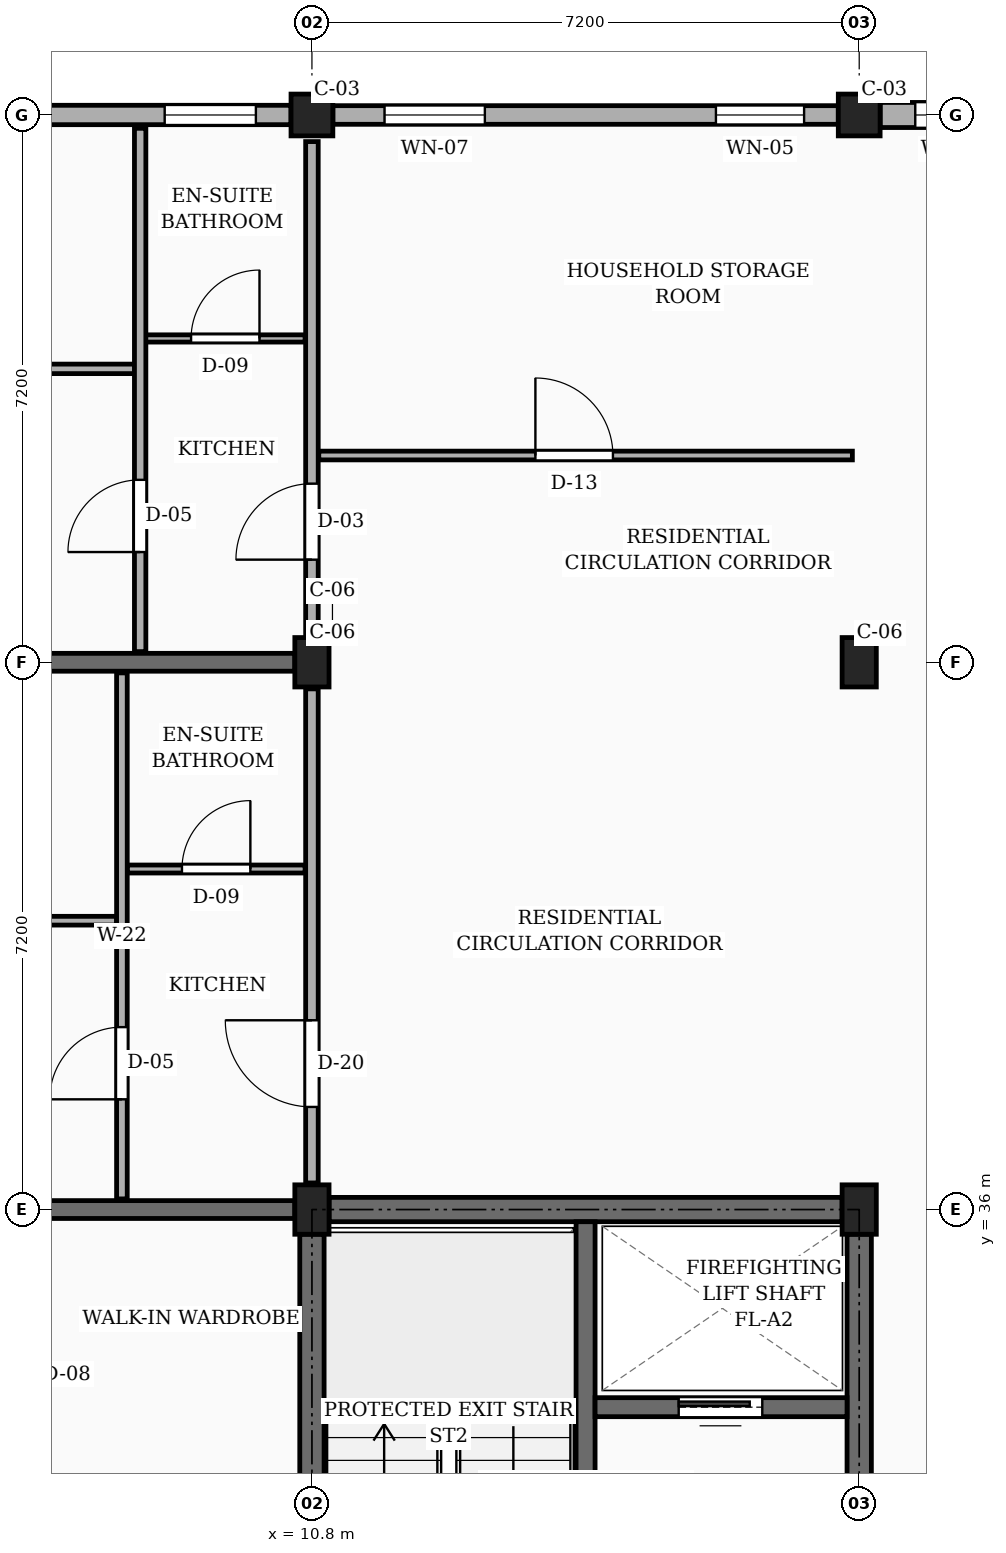
"""IFC4 building model, lengths in metres.
Left out: names, types, materials, properties, quantities, classifications, styles, units other than length and angle.
Written with IfcOpenShell. Run it as: python <this file> out.ifc"""

import sys

from ifc_helpers import new_model, si_unit, direction, frame, frame_2d, origin, origin_2d, place, context, subcontext, project, spatial, rectangle, extrude, element, fill, save


model = new_model("IFC4")
c1 = context("Model", 3, precision=1e-05, world=origin(), true_north=direction((0.0, 1.0)))
c2 = subcontext(c1, "Body", "Model", "MODEL_VIEW")
j1 = project(units=[si_unit("LENGTHUNIT", "METRE"), si_unit("PLANEANGLEUNIT", "RADIAN")], contexts=[c1])
p1 = place(None, origin())
s1 = spatial("IfcSite", under=j1, at=p1, CompositionType="ELEMENT")
p2 = place(p1, origin())
s2 = spatial("IfcBuilding", under=s1, at=p2, CompositionType="ELEMENT")
p3 = place(p2, frame((0.0, 0.0, 17.1)))
s3 = spatial("IfcBuildingStorey", under=s2, at=p3, CompositionType="ELEMENT", Elevation=17.1)
for number, where, z_axis, x_axis in (
    (1, (10.8, 36.0, 0.0), (0.0, 0.0, 1.0), (1.0, 0.0, 0.0)),
    (2, (10.8, 43.2, 0.0), (0.0, 0.0, 1.0), (1.0, 0.0, 0.0)),
):
    element("IfcColumn", number, at=place(p3, frame(where, z_axis=z_axis, x_axis=x_axis)), inside=s3, PredefinedType="COLUMN", context=c2, shape_type="SweptSolid", body=[
        extrude(rectangle(XDim=0.45, YDim=0.65, at=origin_2d()), origin(), (0.0, 0.0, 1.0), 3.15),
    ])
p4 = place(p3, frame((10.8, 50.4, 0.0), z_axis=(0.0, 0.0, 1.0), x_axis=(1.0, 0.0, 0.0)))
e3 = element("IfcColumn", 3, at=p4, inside=s3, PredefinedType="COLUMN", context=c2, shape_type="SweptSolid", body=[
    extrude(rectangle(XDim=0.55, YDim=0.55, at=origin_2d()), origin(), (0.0, 0.0, 1.0), 3.15),
])
for number, where, z_axis, x_axis in (
    (4, (18.0, 36.0, 0.0), (0.0, 0.0, 1.0), (1.0, 0.0, 0.0)),
    (5, (18.0, 43.2, 0.0), (0.0, 0.0, 1.0), (1.0, 0.0, 0.0)),
):
    element("IfcColumn", number, at=place(p3, frame(where, z_axis=z_axis, x_axis=x_axis)), inside=s3, PredefinedType="COLUMN", context=c2, shape_type="SweptSolid", body=[
        extrude(rectangle(XDim=0.45, YDim=0.65, at=origin_2d()), origin(), (0.0, 0.0, 1.0), 3.15),
    ])
p5 = place(p3, frame((18.0, 50.4, 0.0), z_axis=(0.0, 0.0, 1.0), x_axis=(1.0, 0.0, 0.0)))
e6 = element("IfcColumn", 6, at=p5, inside=s3, PredefinedType="COLUMN", context=c2, shape_type="SweptSolid", body=[
    extrude(rectangle(XDim=0.55, YDim=0.55, at=origin_2d()), origin(), (0.0, 0.0, 1.0), 3.15),
])
for number, where, z_axis, x_axis in (
    (7, (3.875, 36.0, 0.0), (0.0, 0.0, 1.0), (1.0, 0.0, 0.0)),
    (8, (3.875, 43.2, 0.0), (0.0, 0.0, 1.0), (1.0, 0.0, 0.0)),
):
    element("IfcWall", number, at=place(p3, frame(where, z_axis=z_axis, x_axis=x_axis)), inside=s3, PredefinedType="SOLIDWALL", context=c2, shape_type="SweptSolid", body=[
        extrude(rectangle(XDim=6.7, YDim=0.235, at=frame_2d((3.35, 0.0))), origin(), (0.0, 0.0, 1.0), 2.17),
    ])
p6 = place(p3, frame((24.925, 50.4, 0.0), z_axis=(0.0, 0.0, 1.0), x_axis=(-1.0, 0.0, 0.0)))
e9 = element("IfcWall", 9, at=p6, inside=s3, PredefinedType="SOLIDWALL", context=c2, shape_type="SweptSolid", body=[
    extrude(rectangle(XDim=6.65, YDim=0.33, at=frame_2d((3.325, 0.0))), origin(), (0.0, 0.0, 1.0), 2.44),
])
p7 = place(p6, frame((1.982, 0.0, 0.78)))
e10 = element("IfcOpeningElement", 10, at=p7, cuts=e9, PredefinedType="OPENING", context=c2, shape_type="SweptSolid", body=[
    extrude(rectangle(XDim=1.0, YDim=1.15, at=frame_2d((0.5, 0.575))), frame((0.0, 0.175, 0.0), z_axis=(0.0, -1.0, 0.0), x_axis=(1.0, 0.0, 0.0)), (0.0, 0.0, 1.0), 0.35),
])
p8 = place(p6, frame((5.147, 0.0, 0.78)))
e11 = element("IfcOpeningElement", 11, at=p8, cuts=e9, PredefinedType="OPENING", context=c2, shape_type="SweptSolid", body=[
    extrude(rectangle(XDim=1.04, YDim=1.26, at=frame_2d((0.52, 0.63))), frame((0.0, 0.175, 0.0), z_axis=(0.0, -1.0, 0.0), x_axis=(1.0, 0.0, 0.0)), (0.0, 0.0, 1.0), 0.35),
])
p9 = place(p3, frame((17.725, 50.4, 0.0), z_axis=(0.0, 0.0, 1.0), x_axis=(-1.0, 0.0, 0.0)))
e12 = element("IfcWall", 12, at=p9, inside=s3, PredefinedType="SOLIDWALL", context=c2, shape_type="SweptSolid", body=[
    extrude(rectangle(XDim=6.65, YDim=0.245, at=frame_2d((3.325, 0.0))), origin(), (0.0, 0.0, 1.0), 2.44),
])
p10 = place(p9, frame((0.45, 0.0, 0.78)))
e13 = element("IfcOpeningElement", 13, at=p10, cuts=e12, PredefinedType="OPENING", context=c2, shape_type="SweptSolid", body=[
    extrude(rectangle(XDim=1.16, YDim=1.15, at=frame_2d((0.58, 0.575))), frame((0.0, 0.133, 0.0), z_axis=(0.0, -1.0, 0.0), x_axis=(1.0, 0.0, 0.0)), (0.0, 0.0, 1.0), 0.265),
])
p11 = place(p9, frame((4.65, 0.0, 0.78)))
e14 = element("IfcOpeningElement", 14, at=p11, cuts=e12, PredefinedType="OPENING", context=c2, shape_type="SweptSolid", body=[
    extrude(rectangle(XDim=1.32, YDim=1.15, at=frame_2d((0.66, 0.575))), frame((0.0, 0.133, 0.0), z_axis=(0.0, -1.0, 0.0), x_axis=(1.0, 0.0, 0.0)), (0.0, 0.0, 1.0), 0.265),
])
p12 = place(p3, frame((10.525, 50.4, 0.0), z_axis=(0.0, 0.0, 1.0), x_axis=(-1.0, 0.0, 0.0)))
e15 = element("IfcWall", 15, at=p12, inside=s3, PredefinedType="SOLIDWALL", context=c2, shape_type="SweptSolid", body=[
    extrude(rectangle(XDim=6.65, YDim=0.255, at=frame_2d((3.325, 0.0))), origin(), (0.0, 0.0, 1.0), 2.44),
])
p13 = place(p12, frame((0.462, 0.0, 0.78)))
e16 = element("IfcOpeningElement", 16, at=p13, cuts=e15, PredefinedType="OPENING", context=c2, shape_type="SweptSolid", body=[
    extrude(rectangle(XDim=1.2, YDim=1.26, at=frame_2d((0.6, 0.63))), frame((0.0, 0.137, 0.0), z_axis=(0.0, -1.0, 0.0), x_axis=(1.0, 0.0, 0.0)), (0.0, 0.0, 1.0), 0.275),
])
p14 = place(p12, frame((3.808, 0.0, 0.78)))
e17 = element("IfcOpeningElement", 17, at=p14, cuts=e15, PredefinedType="OPENING", context=c2, shape_type="SweptSolid", body=[
    extrude(rectangle(XDim=0.88, YDim=1.26, at=frame_2d((0.44, 0.63))), frame((0.0, 0.137, 0.0), z_axis=(0.0, -1.0, 0.0), x_axis=(1.0, 0.0, 0.0)), (0.0, 0.0, 1.0), 0.275),
])
p15 = place(p3, frame((10.8, 29.125, 0.0), z_axis=(0.0, 0.0, 1.0), x_axis=(0.0, 1.0, 0.0)))
e18 = element("IfcWall", 18, at=p15, inside=s3, PredefinedType="SHEAR", context=c2, shape_type="SweptSolid", body=[
    extrude(rectangle(XDim=6.55, YDim=0.32, at=frame_2d((3.275, 0.0))), origin(), (0.0, 0.0, 1.0), 2.87),
])
p16 = place(p3, frame((11.025, 36.0, 0.0), z_axis=(0.0, 0.0, 1.0), x_axis=(1.0, 0.0, 0.0)))
e19 = element("IfcWall", 19, at=p16, inside=s3, PredefinedType="SHEAR", context=c2, shape_type="SweptSolid", body=[
    extrude(rectangle(XDim=6.75, YDim=0.32, at=frame_2d((3.375, 0.0))), origin(), (0.0, 0.0, 1.0), 2.87),
])
p17 = place(p3, frame((18.0, 29.125, 0.0), z_axis=(0.0, 0.0, 1.0), x_axis=(0.0, 1.0, 0.0)))
e20 = element("IfcWall", 20, at=p17, inside=s3, PredefinedType="SHEAR", context=c2, shape_type="SweptSolid", body=[
    extrude(rectangle(XDim=6.55, YDim=0.32, at=frame_2d((3.275, 0.0))), origin(), (0.0, 0.0, 1.0), 2.87),
])
p18 = place(p17, frame((1.5, 0.0, 0.0)))
e21 = element("IfcOpeningElement", 21, at=p18, cuts=e20, PredefinedType="OPENING", context=c2, shape_type="SweptSolid", body=[
    extrude(rectangle(XDim=1.1, YDim=2.15, at=frame_2d((0.55, 1.075))), frame((0.0, 0.17, 0.0), z_axis=(0.0, -1.0, 0.0), x_axis=(1.0, 0.0, 0.0)), (0.0, 0.0, 1.0), 0.34),
])
p19 = place(p3, frame((14.4, 28.96, 0.0), z_axis=(0.0, 0.0, 1.0), x_axis=(0.0, 1.0, 0.0)))
e22 = element("IfcWall", 22, at=p19, inside=s3, PredefinedType="SHEAR", context=c2, shape_type="SweptSolid", body=[
    extrude(rectangle(XDim=6.88, YDim=0.25, at=frame_2d((3.44, 0.0))), origin(), (0.0, 0.0, 1.0), 2.87),
])
p20 = place(p19, frame((0.44, 0.0, 0.0)))
e23 = element("IfcOpeningElement", 23, at=p20, cuts=e22, PredefinedType="OPENING", context=c2, shape_type="SweptSolid", body=[
    extrude(rectangle(XDim=1.05, YDim=2.15, at=frame_2d((0.525, 1.075))), frame((0.0, 0.135, 0.0), z_axis=(0.0, -1.0, 0.0), x_axis=(1.0, 0.0, 0.0)), (0.0, 0.0, 1.0), 0.27),
])
p21 = place(p3, frame((14.525, 33.4, 0.0), z_axis=(0.0, 0.0, 1.0), x_axis=(1.0, 0.0, 0.0)))
e24 = element("IfcWall", 24, at=p21, inside=s3, PredefinedType="SHEAR", context=c2, shape_type="SweptSolid", body=[
    extrude(rectangle(XDim=3.315, YDim=0.25, at=frame_2d((1.658, 0.0))), origin(), (0.0, 0.0, 1.0), 2.87),
])
p22 = place(p21, frame((1.1, 0.0, 0.0)))
e25 = element("IfcOpeningElement", 25, at=p22, cuts=e24, PredefinedType="OPENING", context=c2, shape_type="SweptSolid", body=[
    extrude(rectangle(XDim=1.1, YDim=2.2, at=frame_2d((0.55, 1.1))), frame((0.0, 0.135, 0.0), z_axis=(0.0, -1.0, 0.0), x_axis=(1.0, 0.0, 0.0)), (0.0, 0.0, 1.0), 0.27),
])
p23 = place(p3, frame((10.8, 36.35, 0.0), z_axis=(0.0, 0.0, 1.0), x_axis=(0.0, 1.0, 0.0)))
e26 = element("IfcWall", 26, at=p23, inside=s3, PredefinedType="PARTITIONING", context=c2, shape_type="SweptSolid", body=[
    extrude(rectangle(XDim=6.5, YDim=0.165, at=frame_2d((3.25, 0.0))), origin(), (0.0, 0.0, 1.0), 2.305),
])
p24 = place(p23, frame((1.0, 0.0, 0.0)))
e27 = element("IfcOpeningElement", 27, at=p24, cuts=e26, PredefinedType="OPENING", context=c2, shape_type="SweptSolid", body=[
    extrude(rectangle(XDim=1.14, YDim=2.18, at=frame_2d((0.57, 1.09))), frame((0.0, 0.093, 0.0), z_axis=(0.0, -1.0, 0.0), x_axis=(1.0, 0.0, 0.0)), (0.0, 0.0, 1.0), 0.185),
])
p25 = place(p3, frame((10.8, 43.55, 0.0), z_axis=(0.0, 0.0, 1.0), x_axis=(0.0, 1.0, 0.0)))
e28 = element("IfcWall", 28, at=p25, inside=s3, PredefinedType="PARTITIONING", context=c2, shape_type="SweptSolid", body=[
    extrude(rectangle(XDim=6.5, YDim=0.165, at=frame_2d((3.25, 0.0))), origin(), (0.0, 0.0, 1.0), 2.305),
])
p26 = place(p25, frame((1.0, 0.0, 0.0)))
e29 = element("IfcOpeningElement", 29, at=p26, cuts=e28, PredefinedType="OPENING", context=c2, shape_type="SweptSolid", body=[
    extrude(rectangle(XDim=1.0, YDim=2.15, at=frame_2d((0.5, 1.075))), frame((0.0, 0.093, 0.0), z_axis=(0.0, -1.0, 0.0), x_axis=(1.0, 0.0, 0.0)), (0.0, 0.0, 1.0), 0.185),
])
p27 = place(p3, frame((3.775, 39.8, 0.0), z_axis=(0.0, 0.0, 1.0), x_axis=(1.0, 0.0, 0.0)))
e30 = element("IfcWall", 30, at=p27, inside=s3, PredefinedType="PARTITIONING", context=c2, shape_type="SweptSolid", body=[
    extrude(rectangle(XDim=4.455, YDim=0.115, at=frame_2d((2.228, 0.0))), origin(), (0.0, 0.0, 1.0), 2.305),
])
p28 = place(p27, frame((1.778, 0.0, 0.0)))
e31 = element("IfcOpeningElement", 31, at=p28, cuts=e30, PredefinedType="OPENING", context=c2, shape_type="SweptSolid", body=[
    extrude(rectangle(XDim=0.9, YDim=2.1, at=frame_2d((0.45, 1.05))), frame((0.0, 0.067, 0.0), z_axis=(0.0, -1.0, 0.0), x_axis=(1.0, 0.0, 0.0)), (0.0, 0.0, 1.0), 0.135),
])
p29 = place(p3, frame((8.37, 40.48, 0.0), z_axis=(0.0, 0.0, 1.0), x_axis=(1.0, 0.0, 0.0)))
e32 = element("IfcWall", 32, at=p29, inside=s3, PredefinedType="PARTITIONING", context=c2, shape_type="SweptSolid", body=[
    extrude(rectangle(XDim=2.34, YDim=0.105, at=frame_2d((1.17, 0.0))), origin(), (0.0, 0.0, 1.0), 2.305),
])
p30 = place(p29, frame((0.72, 0.0, 0.0)))
e33 = element("IfcOpeningElement", 33, at=p30, cuts=e32, PredefinedType="OPENING", context=c2, shape_type="SweptSolid", body=[
    extrude(rectangle(XDim=0.9, YDim=2.05, at=frame_2d((0.45, 1.025))), frame((0.0, 0.062, 0.0), z_axis=(0.0, -1.0, 0.0), x_axis=(1.0, 0.0, 0.0)), (0.0, 0.0, 1.0), 0.125),
])
p31 = place(p3, frame((8.3, 36.14, 0.0), z_axis=(0.0, 0.0, 1.0), x_axis=(0.0, 1.0, 0.0)))
e34 = element("IfcWall", 34, at=p31, inside=s3, PredefinedType="PARTITIONING", context=c2, shape_type="SweptSolid", body=[
    extrude(rectangle(XDim=6.92, YDim=0.14, at=frame_2d((3.46, 0.0))), origin(), (0.0, 0.0, 1.0), 2.305),
])
p32 = place(p31, frame((1.31, 0.0, 0.0)))
e35 = element("IfcOpeningElement", 35, at=p32, cuts=e34, PredefinedType="OPENING", context=c2, shape_type="SweptSolid", body=[
    extrude(rectangle(XDim=0.95, YDim=2.1, at=frame_2d((0.475, 1.05))), frame((0.0, 0.08, 0.0), z_axis=(0.0, -1.0, 0.0), x_axis=(1.0, 0.0, 0.0)), (0.0, 0.0, 1.0), 0.16),
])
p33 = place(p3, frame((10.89, 45.92, 0.0), z_axis=(0.0, 0.0, 1.0), x_axis=(1.0, 0.0, 0.0)))
e36 = element("IfcWall", 36, at=p33, inside=s3, PredefinedType="PARTITIONING", context=c2, shape_type="SweptSolid", body=[
    extrude(rectangle(XDim=7.02, YDim=0.115, at=frame_2d((3.51, 0.0))), origin(), (0.0, 0.0, 1.0), 2.305),
])
p34 = place(p33, frame((2.85, 0.0, 0.0)))
e37 = element("IfcOpeningElement", 37, at=p34, cuts=e36, PredefinedType="OPENING", context=c2, shape_type="SweptSolid", body=[
    extrude(rectangle(XDim=1.02, YDim=2.15, at=frame_2d((0.51, 1.075))), frame((0.0, 0.067, 0.0), z_axis=(0.0, -1.0, 0.0), x_axis=(1.0, 0.0, 0.0)), (0.0, 0.0, 1.0), 0.135),
])
p35 = place(p3, frame((3.775, 47.06, 0.0), z_axis=(0.0, 0.0, 1.0), x_axis=(1.0, 0.0, 0.0)))
e38 = element("IfcWall", 38, at=p35, inside=s3, PredefinedType="PARTITIONING", context=c2, shape_type="SweptSolid", body=[
    extrude(rectangle(XDim=4.695, YDim=0.125, at=frame_2d((2.348, 0.0))), origin(), (0.0, 0.0, 1.0), 2.305),
])
p36 = place(p35, frame((1.897, 0.0, 0.0)))
e39 = element("IfcOpeningElement", 39, at=p36, cuts=e38, PredefinedType="OPENING", context=c2, shape_type="SweptSolid", body=[
    extrude(rectangle(XDim=0.9, YDim=2.1, at=frame_2d((0.45, 1.05))), frame((0.0, 0.073, 0.0), z_axis=(0.0, -1.0, 0.0), x_axis=(1.0, 0.0, 0.0)), (0.0, 0.0, 1.0), 0.145),
])
p37 = place(p3, frame((8.61, 47.46, 0.0), z_axis=(0.0, 0.0, 1.0), x_axis=(1.0, 0.0, 0.0)))
e40 = element("IfcWall", 40, at=p37, inside=s3, PredefinedType="PARTITIONING", context=c2, shape_type="SweptSolid", body=[
    extrude(rectangle(XDim=2.1, YDim=0.095, at=frame_2d((1.05, 0.0))), origin(), (0.0, 0.0, 1.0), 2.305),
])
p38 = place(p37, frame((0.6, 0.0, 0.0)))
e41 = element("IfcOpeningElement", 41, at=p38, cuts=e40, PredefinedType="OPENING", context=c2, shape_type="SweptSolid", body=[
    extrude(rectangle(XDim=0.9, YDim=2.05, at=frame_2d((0.45, 1.025))), frame((0.0, 0.058, 0.0), z_axis=(0.0, -1.0, 0.0), x_axis=(1.0, 0.0, 0.0)), (0.0, 0.0, 1.0), 0.115),
])
p39 = place(p3, frame((8.54, 43.34, 0.0), z_axis=(0.0, 0.0, 1.0), x_axis=(0.0, 1.0, 0.0)))
e42 = element("IfcWall", 42, at=p39, inside=s3, PredefinedType="PARTITIONING", context=c2, shape_type="SweptSolid", body=[
    extrude(rectangle(XDim=6.885, YDim=0.15, at=frame_2d((3.442, 0.0))), origin(), (0.0, 0.0, 1.0), 2.305),
])
p40 = place(p39, frame((1.31, 0.0, 0.0)))
e43 = element("IfcOpeningElement", 43, at=p40, cuts=e42, PredefinedType="OPENING", context=c2, shape_type="SweptSolid", body=[
    extrude(rectangle(XDim=0.95, YDim=2.1, at=frame_2d((0.475, 1.05))), frame((0.0, 0.085, 0.0), z_axis=(0.0, -1.0, 0.0), x_axis=(1.0, 0.0, 0.0)), (0.0, 0.0, 1.0), 0.17),
])
p41 = place(p8, origin())
e44 = element("IfcWindow", 44, at=p41, inside=s3, PartitioningType="SINGLE_PANEL", PredefinedType="WINDOW", context=c2, shape_type="SweptSolid", body=[
    extrude(rectangle(XDim=1.04, YDim=1.26, at=frame_2d((0.52, 0.63))), frame((0.0, 0.03, 0.0), z_axis=(0.0, -1.0, 0.0), x_axis=(1.0, 0.0, 0.0)), (0.0, 0.0, 1.0), 0.06),
])
fill(e11, e44)
p42 = place(p10, origin())
e45 = element("IfcWindow", 45, at=p42, inside=s3, PartitioningType="SINGLE_PANEL", PredefinedType="WINDOW", context=c2, shape_type="SweptSolid", body=[
    extrude(rectangle(XDim=1.16, YDim=1.15, at=frame_2d((0.58, 0.575))), frame((0.0, 0.03, 0.0), z_axis=(0.0, -1.0, 0.0), x_axis=(1.0, 0.0, 0.0)), (0.0, 0.0, 1.0), 0.06),
])
fill(e13, e45)
p43 = place(p11, origin())
e46 = element("IfcWindow", 46, at=p43, inside=s3, PartitioningType="SINGLE_PANEL", PredefinedType="WINDOW", context=c2, shape_type="SweptSolid", body=[
    extrude(rectangle(XDim=1.32, YDim=1.15, at=frame_2d((0.66, 0.575))), frame((0.0, 0.03, 0.0), z_axis=(0.0, -1.0, 0.0), x_axis=(1.0, 0.0, 0.0)), (0.0, 0.0, 1.0), 0.06),
])
fill(e14, e46)
p44 = place(p13, origin())
e47 = element("IfcWindow", 47, at=p44, inside=s3, PartitioningType="SINGLE_PANEL", PredefinedType="WINDOW", context=c2, shape_type="SweptSolid", body=[
    extrude(rectangle(XDim=1.2, YDim=1.26, at=frame_2d((0.6, 0.63))), frame((0.0, 0.03, 0.0), z_axis=(0.0, -1.0, 0.0), x_axis=(1.0, 0.0, 0.0)), (0.0, 0.0, 1.0), 0.06),
])
fill(e16, e47)
p45 = place(p22, origin())
e48 = element("IfcDoor", 48, at=p45, inside=s3, OperationType="SLIDING_TO_LEFT", PredefinedType="DOOR", context=c2, shape_type="SweptSolid", body=[
    extrude(rectangle(XDim=1.1, YDim=2.2, at=frame_2d((0.55, 1.1))), frame((0.0, 0.025, 0.0), z_axis=(0.0, -1.0, 0.0), x_axis=(1.0, 0.0, 0.0)), (0.0, 0.0, 1.0), 0.05),
])
fill(e25, e48)
p46 = place(p24, origin())
e49 = element("IfcDoor", 49, at=p46, inside=s3, OperationType="SINGLE_SWING_RIGHT", PredefinedType="DOOR", context=c2, shape_type="SweptSolid", body=[
    extrude(rectangle(XDim=1.14, YDim=2.18, at=frame_2d((0.57, 1.09))), frame((0.0, 0.025, 0.0), z_axis=(0.0, -1.0, 0.0), x_axis=(1.0, 0.0, 0.0)), (0.0, 0.0, 1.0), 0.05),
])
fill(e27, e49)
p47 = place(p26, origin())
e50 = element("IfcDoor", 50, at=p47, inside=s3, OperationType="SINGLE_SWING_LEFT", PredefinedType="DOOR", context=c2, shape_type="SweptSolid", body=[
    extrude(rectangle(XDim=1.0, YDim=2.15, at=frame_2d((0.5, 1.075))), frame((0.0, 0.025, 0.0), z_axis=(0.0, -1.0, 0.0), x_axis=(1.0, 0.0, 0.0)), (0.0, 0.0, 1.0), 0.05),
])
fill(e29, e50)
p48 = place(p30, origin())
e51 = element("IfcDoor", 51, at=p48, inside=s3, OperationType="SINGLE_SWING_RIGHT", PredefinedType="DOOR", context=c2, shape_type="SweptSolid", body=[
    extrude(rectangle(XDim=0.9, YDim=2.05, at=frame_2d((0.45, 1.025))), frame((0.0, 0.025, 0.0), z_axis=(0.0, -1.0, 0.0), x_axis=(1.0, 0.0, 0.0)), (0.0, 0.0, 1.0), 0.05),
])
fill(e33, e51)
p49 = place(p32, origin())
e52 = element("IfcDoor", 52, at=p49, inside=s3, OperationType="SINGLE_SWING_LEFT", PredefinedType="DOOR", context=c2, shape_type="SweptSolid", body=[
    extrude(rectangle(XDim=0.95, YDim=2.1, at=frame_2d((0.475, 1.05))), frame((0.0, 0.025, 0.0), z_axis=(0.0, -1.0, 0.0), x_axis=(1.0, 0.0, 0.0)), (0.0, 0.0, 1.0), 0.05),
])
fill(e35, e52)
p50 = place(p34, origin())
e53 = element("IfcDoor", 53, at=p50, inside=s3, OperationType="SINGLE_SWING_LEFT", PredefinedType="DOOR", context=c2, shape_type="SweptSolid", body=[
    extrude(rectangle(XDim=1.02, YDim=2.15, at=frame_2d((0.51, 1.075))), frame((0.0, 0.025, 0.0), z_axis=(0.0, -1.0, 0.0), x_axis=(1.0, 0.0, 0.0)), (0.0, 0.0, 1.0), 0.05),
])
fill(e37, e53)
p51 = place(p38, origin())
e54 = element("IfcDoor", 54, at=p51, inside=s3, OperationType="SINGLE_SWING_RIGHT", PredefinedType="DOOR", context=c2, shape_type="SweptSolid", body=[
    extrude(rectangle(XDim=0.9, YDim=2.05, at=frame_2d((0.45, 1.025))), frame((0.0, 0.025, 0.0), z_axis=(0.0, -1.0, 0.0), x_axis=(1.0, 0.0, 0.0)), (0.0, 0.0, 1.0), 0.05),
])
fill(e41, e54)
p52 = place(p40, origin())
e55 = element("IfcDoor", 55, at=p52, inside=s3, OperationType="SINGLE_SWING_LEFT", PredefinedType="DOOR", context=c2, shape_type="SweptSolid", body=[
    extrude(rectangle(XDim=0.95, YDim=2.1, at=frame_2d((0.475, 1.05))), frame((0.0, 0.025, 0.0), z_axis=(0.0, -1.0, 0.0), x_axis=(1.0, 0.0, 0.0)), (0.0, 0.0, 1.0), 0.05),
])
fill(e43, e55)
save(model, sys.argv[1])
